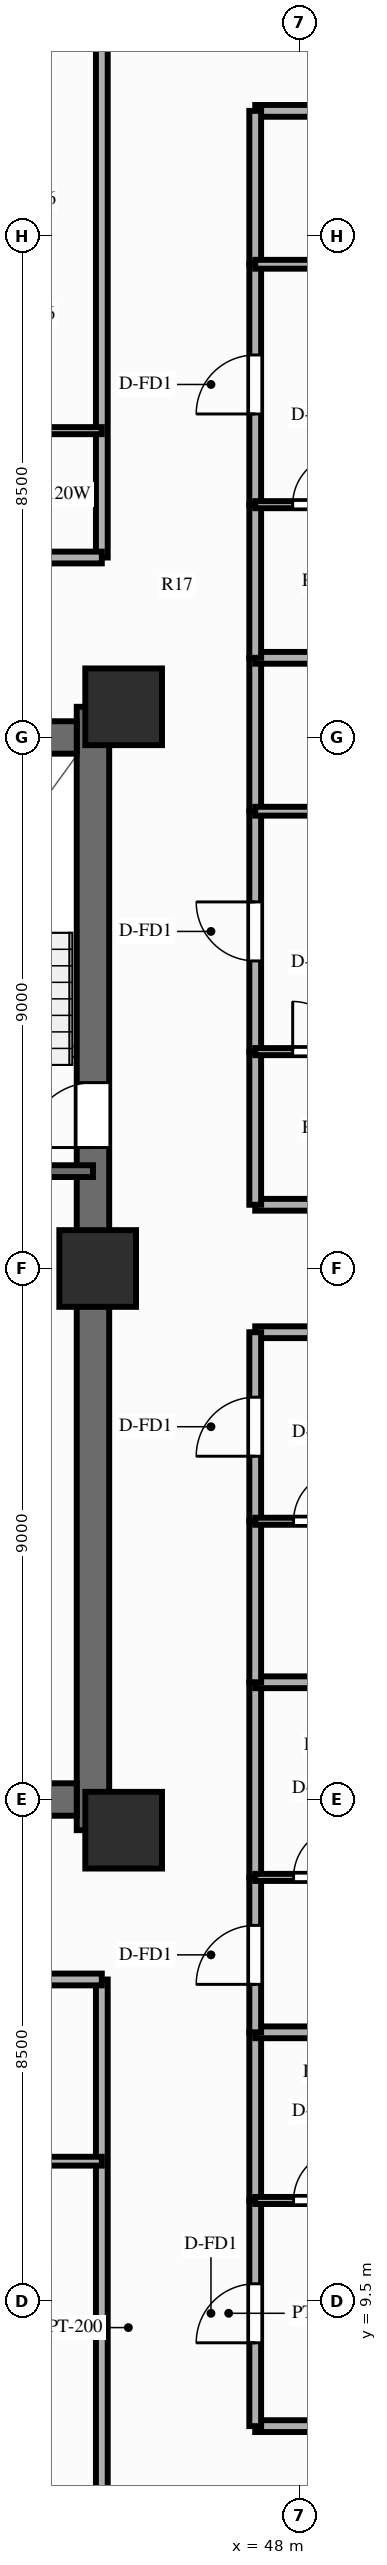
"""IFC4 building model, lengths in metres.
Left out: names, types, materials, properties, quantities, classifications, styles, units other than length and angle.
Written with IfcOpenShell. Run it as: python <this file> out.ifc"""

import sys

from ifc_helpers import new_model, si_unit, direction, frame, frame_2d, origin, origin_2d, place, context, subcontext, project, spatial, rectangle, extrude, source, transform, mapped, element, fill, save


model = new_model("IFC4")
c1 = context("Model", 3, precision=1e-05, world=origin(), true_north=direction((0.0, 1.0)))
c2 = subcontext(c1, "Body", "Model", "MODEL_VIEW")
j1 = project(units=[si_unit("LENGTHUNIT", "METRE"), si_unit("PLANEANGLEUNIT", "RADIAN")], contexts=[c1])
p1 = place(None, origin())
s1 = spatial("IfcSite", under=j1, at=p1, CompositionType="ELEMENT")
p2 = place(p1, origin())
s2 = spatial("IfcBuilding", under=s1, at=p2, CompositionType="ELEMENT")
p3 = place(p2, frame((0.0, 0.0, 113.85)))
s3 = spatial("IfcBuildingStorey", under=s2, at=p3, CompositionType="ELEMENT", Elevation=113.85)
p4 = place(p3, frame((44.5, 17.48, 0.0), z_axis=(0.0, 0.0, 1.0), x_axis=(0.0, 1.0, 0.0)))
e1 = element("IfcWall", 1, at=p4, inside=s3, PredefinedType="SHEAR", context=c2, shape_type="SweptSolid", body=[
    extrude(rectangle(XDim=19.04, YDim=0.55, at=frame_2d((9.52, 0.0))), origin(), (0.0, 0.0, 1.0), 3.0),
])
p5 = place(p4, frame((12.67, 0.0, 0.0), z_axis=(0.0, 0.0, 1.0), x_axis=(-1.0, 0.0, 0.0)))
e2 = element("IfcOpeningElement", 2, at=p5, cuts=e1, PredefinedType="OPENING", context=c2, shape_type="SweptSolid", body=[
    extrude(rectangle(XDim=1.1, YDim=2.15, at=frame_2d((0.55, 1.075))), frame((0.0, 0.287, 0.0), z_axis=(0.0, -1.0, 0.0), x_axis=(1.0, 0.0, 0.0)), (0.0, 0.0, 1.0), 0.574),
])
p6 = place(p3, frame((31.775, 18.0, 0.0), z_axis=(0.0, 0.0, 1.0), x_axis=(1.0, 0.0, 0.0)))
e3 = element("IfcWall", 3, at=p6, inside=s3, PredefinedType="SHEAR", context=c2, shape_type="SweptSolid", body=[
    extrude(rectangle(XDim=12.45, YDim=0.55, at=frame_2d((6.225, 0.0))), origin(), (0.0, 0.0, 1.0), 3.0),
])
p7 = place(p3, frame((31.775, 36.0, 0.0), z_axis=(0.0, 0.0, 1.0), x_axis=(1.0, 0.0, 0.0)))
e4 = element("IfcWall", 4, at=p7, inside=s3, PredefinedType="SHEAR", context=c2, shape_type="SweptSolid", body=[
    extrude(rectangle(XDim=12.45, YDim=0.55, at=frame_2d((6.225, 0.0))), origin(), (0.0, 0.0, 1.0), 3.0),
])
p8 = place(p7, frame((5.175, 0.0, 0.0), z_axis=(0.0, 0.0, 1.0), x_axis=(-1.0, 0.0, 0.0)))
e5 = element("IfcOpeningElement", 5, at=p8, cuts=e4, PredefinedType="OPENING", context=c2, shape_type="SweptSolid", body=[
    extrude(rectangle(XDim=1.4, YDim=2.15, at=frame_2d((0.7, 1.075))), frame((0.0, 0.287, 0.0), z_axis=(0.0, -1.0, 0.0), x_axis=(1.0, 0.0, 0.0)), (0.0, 0.0, 1.0), 0.574),
])
m1 = source(origin(), c2, "Body", "SweptSolid", [
    extrude(rectangle(XDim=1.3, YDim=1.3, at=origin_2d()), origin(), (0.0, 0.0, 1.0), 3.0),
])
for number, where, z_axis, x_axis in (
    (6, (45.02, 17.48, 0.0), (0.0, 0.0, 1.0), (1.0, 0.0, 0.0)),
    (7, (45.02, 36.52, 0.0), (0.0, 0.0, 1.0), (1.0, 0.0, 0.0)),
    (8, (44.58, 27.0, 0.0), (0.0, 0.0, 1.0), (1.0, 0.0, 0.0)),
):
    element("IfcColumn", number, at=place(p3, frame(where, z_axis=z_axis, x_axis=x_axis)), inside=s3, PredefinedType="COLUMN", context=c2, shape_type="MappedRepresentation", body=[
        mapped(m1, transform((0.0, 0.0, 0.0), scale=1.0)),
    ])
p9 = place(p3, frame((40.57, 28.65, 0.0), z_axis=(0.0, 0.0, 1.0), x_axis=(1.0, 0.0, 0.0)))
e9 = element("IfcWall", 9, at=p9, inside=s3, PredefinedType="SOLIDWALL", context=c2, shape_type="SweptSolid", body=[
    extrude(rectangle(XDim=3.93, YDim=0.2, at=frame_2d((1.965, 0.0))), origin(), (0.0, 0.0, 1.0), 2.79),
])
p10 = place(p3, frame((44.65, 14.95, 0.0), z_axis=(0.0, 0.0, 1.0), x_axis=(0.0, -1.0, 0.0)))
e10 = element("IfcWall", 10, at=p10, inside=s3, PredefinedType="PARTITIONING", context=c2, shape_type="SweptSolid", body=[
    extrude(rectangle(XDim=11.8, YDim=0.2, at=frame_2d((5.9, 0.0))), origin(), (0.0, 0.0, 1.0), 2.34),
])
p11 = place(p3, frame((40.923, 14.95, 0.0), z_axis=(0.0, 0.0, 1.0), x_axis=(1.0, 0.0, 0.0)))
e11 = element("IfcWall", 11, at=p11, inside=s3, PredefinedType="PARTITIONING", context=c2, shape_type="SweptSolid", body=[
    extrude(rectangle(XDim=3.727, YDim=0.2, at=frame_2d((1.864, 0.0))), origin(), (0.0, 0.0, 1.0), 2.79),
])
p12 = place(p3, frame((40.923, 11.87, 0.0), z_axis=(0.0, 0.0, 1.0), x_axis=(1.0, 0.0, 0.0)))
e12 = element("IfcWall", 12, at=p12, inside=s3, PredefinedType="PARTITIONING", context=c2, shape_type="SweptSolid", body=[
    extrude(rectangle(XDim=3.727, YDim=0.15, at=frame_2d((1.864, 0.0))), origin(), (0.0, 0.0, 1.0), 2.79),
])
p13 = place(p3, frame((44.65, 39.05, 0.0), z_axis=(0.0, 0.0, 1.0), x_axis=(0.0, 1.0, 0.0)))
e13 = element("IfcWall", 13, at=p13, inside=s3, PredefinedType="PARTITIONING", context=c2, shape_type="SweptSolid", body=[
    extrude(rectangle(XDim=11.8, YDim=0.2, at=frame_2d((5.9, 0.0))), origin(), (0.0, 0.0, 1.0), 2.34),
])
p14 = place(p3, frame((42.55, 39.05, 0.0), z_axis=(0.0, 0.0, 1.0), x_axis=(1.0, 0.0, 0.0)))
e14 = element("IfcWall", 14, at=p14, inside=s3, PredefinedType="PARTITIONING", context=c2, shape_type="SweptSolid", body=[
    extrude(rectangle(XDim=2.1, YDim=0.2, at=frame_2d((1.05, 0.0))), origin(), (0.0, 0.0, 1.0), 2.79),
])
p15 = place(p3, frame((42.55, 41.2, 0.0), z_axis=(0.0, 0.0, 1.0), x_axis=(1.0, 0.0, 0.0)))
e15 = element("IfcWall", 15, at=p15, inside=s3, PredefinedType="PARTITIONING", context=c2, shape_type="SweptSolid", body=[
    extrude(rectangle(XDim=2.1, YDim=0.12, at=frame_2d((1.05, 0.0))), origin(), (0.0, 0.0, 1.0), 2.79),
])
for number, where, z_axis, x_axis in (
    (16, (47.25, 7.38, 0.0), (0.0, 0.0, 1.0), (1.0, 0.0, 0.0)),
    (17, (47.25, 25.92, 0.0), (0.0, 0.0, 1.0), (1.0, 0.0, 0.0)),
):
    element("IfcWall", number, at=place(p3, frame(where, z_axis=z_axis, x_axis=x_axis)), inside=s3, PredefinedType="PARTITIONING", context=c2, shape_type="SweptSolid", body=[
        extrude(rectangle(XDim=16.6, YDim=0.2, at=frame_2d((8.3, 0.0))), origin(), (0.0, 0.0, 1.0), 2.79),
    ])
p16 = place(p3, frame((47.25, 7.38, 0.0), z_axis=(0.0, 0.0, 1.0), x_axis=(0.0, 1.0, 0.0)))
e18 = element("IfcWall", 18, at=p16, inside=s3, PredefinedType="PARTITIONING", context=c2, shape_type="SweptSolid", body=[
    extrude(rectangle(XDim=3.824, YDim=0.2, at=frame_2d((1.912, 0.0))), origin(), (0.0, 0.0, 1.0), 2.79),
])
p17 = place(p16, frame((1.412, 0.0, 0.0)))
e19 = element("IfcOpeningElement", 19, at=p17, cuts=e18, PredefinedType="OPENING", context=c2, shape_type="SweptSolid", body=[
    extrude(rectangle(XDim=1.0, YDim=2.15, at=frame_2d((0.5, 1.075))), frame((0.0, 0.112, 0.0), z_axis=(0.0, -1.0, 0.0), x_axis=(1.0, 0.0, 0.0)), (0.0, 0.0, 1.0), 0.224),
])
p18 = place(p3, frame((47.25, 11.204, 0.0), z_axis=(0.0, 0.0, 1.0), x_axis=(0.0, 1.0, 0.0)))
e20 = element("IfcWall", 20, at=p18, inside=s3, PredefinedType="PARTITIONING", context=c2, shape_type="SweptSolid", body=[
    extrude(rectangle(XDim=2.85, YDim=0.2, at=frame_2d((1.425, 0.0))), origin(), (0.0, 0.0, 1.0), 2.79),
])
p19 = place(p3, frame((47.25, 11.204, 0.0), z_axis=(0.0, 0.0, 1.0), x_axis=(1.0, 0.0, 0.0)))
e21 = element("IfcWall", 21, at=p19, inside=s3, PredefinedType="PARTITIONING", context=c2, shape_type="SweptSolid", body=[
    extrude(rectangle(XDim=2.15, YDim=0.12, at=frame_2d((1.075, 0.0))), origin(), (0.0, 0.0, 1.0), 2.79),
])
p20 = place(p19, frame((0.65, 0.0, 0.0)))
e22 = element("IfcOpeningElement", 22, at=p20, cuts=e21, PredefinedType="OPENING", context=c2, shape_type="SweptSolid", body=[
    extrude(rectangle(XDim=0.85, YDim=2.05, at=frame_2d((0.425, 1.025))), frame((0.0, 0.072, 0.0), z_axis=(0.0, -1.0, 0.0), x_axis=(1.0, 0.0, 0.0)), (0.0, 0.0, 1.0), 0.144),
])
p21 = place(p3, frame((47.25, 14.054, 0.0), z_axis=(0.0, 0.0, 1.0), x_axis=(1.0, 0.0, 0.0)))
e23 = element("IfcWall", 23, at=p21, inside=s3, PredefinedType="PARTITIONING", context=c2, shape_type="SweptSolid", body=[
    extrude(rectangle(XDim=16.6, YDim=0.2, at=frame_2d((8.3, 0.0))), origin(), (0.0, 0.0, 1.0), 2.79),
])
p22 = place(p3, frame((47.25, 14.054, 0.0), z_axis=(0.0, 0.0, 1.0), x_axis=(0.0, 1.0, 0.0)))
e24 = element("IfcWall", 24, at=p22, inside=s3, PredefinedType="PARTITIONING", context=c2, shape_type="SweptSolid", body=[
    extrude(rectangle(XDim=2.625, YDim=0.2, at=frame_2d((1.313, 0.0))), origin(), (0.0, 0.0, 1.0), 2.79),
])
p23 = place(p22, frame((0.813, 0.0, 0.0)))
e25 = element("IfcOpeningElement", 25, at=p23, cuts=e24, PredefinedType="OPENING", context=c2, shape_type="SweptSolid", body=[
    extrude(rectangle(XDim=1.0, YDim=2.15, at=frame_2d((0.5, 1.075))), frame((0.0, 0.112, 0.0), z_axis=(0.0, -1.0, 0.0), x_axis=(1.0, 0.0, 0.0)), (0.0, 0.0, 1.0), 0.224),
])
p24 = place(p3, frame((47.25, 16.68, 0.0), z_axis=(0.0, 0.0, 1.0), x_axis=(0.0, 1.0, 0.0)))
e26 = element("IfcWall", 26, at=p24, inside=s3, PredefinedType="PARTITIONING", context=c2, shape_type="SweptSolid", body=[
    extrude(rectangle(XDim=3.307, YDim=0.2, at=frame_2d((1.654, 0.0))), origin(), (0.0, 0.0, 1.0), 2.79),
])
p25 = place(p3, frame((47.25, 16.68, 0.0), z_axis=(0.0, 0.0, 1.0), x_axis=(1.0, 0.0, 0.0)))
e27 = element("IfcWall", 27, at=p25, inside=s3, PredefinedType="PARTITIONING", context=c2, shape_type="SweptSolid", body=[
    extrude(rectangle(XDim=2.15, YDim=0.12, at=frame_2d((1.075, 0.0))), origin(), (0.0, 0.0, 1.0), 2.79),
])
p26 = place(p25, frame((0.65, 0.0, 0.0)))
e28 = element("IfcOpeningElement", 28, at=p26, cuts=e27, PredefinedType="OPENING", context=c2, shape_type="SweptSolid", body=[
    extrude(rectangle(XDim=0.85, YDim=2.05, at=frame_2d((0.425, 1.025))), frame((0.0, 0.072, 0.0), z_axis=(0.0, -1.0, 0.0), x_axis=(1.0, 0.0, 0.0)), (0.0, 0.0, 1.0), 0.144),
])
p27 = place(p3, frame((47.25, 19.987, 0.0), z_axis=(0.0, 0.0, 1.0), x_axis=(1.0, 0.0, 0.0)))
e29 = element("IfcWall", 29, at=p27, inside=s3, PredefinedType="PARTITIONING", context=c2, shape_type="SweptSolid", body=[
    extrude(rectangle(XDim=16.6, YDim=0.2, at=frame_2d((8.3, 0.0))), origin(), (0.0, 0.0, 1.0), 2.79),
])
p28 = place(p3, frame((47.25, 19.987, 0.0), z_axis=(0.0, 0.0, 1.0), x_axis=(0.0, 1.0, 0.0)))
e30 = element("IfcWall", 30, at=p28, inside=s3, PredefinedType="PARTITIONING", context=c2, shape_type="SweptSolid", body=[
    extrude(rectangle(XDim=2.729, YDim=0.2, at=frame_2d((1.365, 0.0))), origin(), (0.0, 0.0, 1.0), 2.79),
])
p29 = place(p3, frame((47.25, 22.716, 0.0), z_axis=(0.0, 0.0, 1.0), x_axis=(0.0, 1.0, 0.0)))
e31 = element("IfcWall", 31, at=p29, inside=s3, PredefinedType="PARTITIONING", context=c2, shape_type="SweptSolid", body=[
    extrude(rectangle(XDim=3.204, YDim=0.2, at=frame_2d((1.602, 0.0))), origin(), (0.0, 0.0, 1.0), 2.79),
])
p30 = place(p29, frame((1.102, 0.0, 0.0)))
e32 = element("IfcOpeningElement", 32, at=p30, cuts=e31, PredefinedType="OPENING", context=c2, shape_type="SweptSolid", body=[
    extrude(rectangle(XDim=1.0, YDim=2.15, at=frame_2d((0.5, 1.075))), frame((0.0, 0.112, 0.0), z_axis=(0.0, -1.0, 0.0), x_axis=(1.0, 0.0, 0.0)), (0.0, 0.0, 1.0), 0.224),
])
p31 = place(p3, frame((47.25, 22.716, 0.0), z_axis=(0.0, 0.0, 1.0), x_axis=(1.0, 0.0, 0.0)))
e33 = element("IfcWall", 33, at=p31, inside=s3, PredefinedType="PARTITIONING", context=c2, shape_type="SweptSolid", body=[
    extrude(rectangle(XDim=2.15, YDim=0.12, at=frame_2d((1.075, 0.0))), origin(), (0.0, 0.0, 1.0), 2.79),
])
p32 = place(p31, frame((0.65, 0.0, 0.0)))
e34 = element("IfcOpeningElement", 34, at=p32, cuts=e33, PredefinedType="OPENING", context=c2, shape_type="SweptSolid", body=[
    extrude(rectangle(XDim=0.85, YDim=2.05, at=frame_2d((0.425, 1.025))), frame((0.0, 0.072, 0.0), z_axis=(0.0, -1.0, 0.0), x_axis=(1.0, 0.0, 0.0)), (0.0, 0.0, 1.0), 0.144),
])
for number, where, z_axis, x_axis in (
    (35, (47.25, 28.08, 0.0), (0.0, 0.0, 1.0), (1.0, 0.0, 0.0)),
    (36, (47.25, 46.62, 0.0), (0.0, 0.0, 1.0), (1.0, 0.0, 0.0)),
):
    element("IfcWall", number, at=place(p3, frame(where, z_axis=z_axis, x_axis=x_axis)), inside=s3, PredefinedType="PARTITIONING", context=c2, shape_type="SweptSolid", body=[
        extrude(rectangle(XDim=16.6, YDim=0.2, at=frame_2d((8.3, 0.0))), origin(), (0.0, 0.0, 1.0), 2.79),
    ])
p33 = place(p3, frame((47.25, 28.08, 0.0), z_axis=(0.0, 0.0, 1.0), x_axis=(0.0, 1.0, 0.0)))
e37 = element("IfcWall", 37, at=p33, inside=s3, PredefinedType="PARTITIONING", context=c2, shape_type="SweptSolid", body=[
    extrude(rectangle(XDim=2.595, YDim=0.2, at=frame_2d((1.298, 0.0))), origin(), (0.0, 0.0, 1.0), 2.79),
])
p34 = place(p3, frame((47.25, 30.676, 0.0), z_axis=(0.0, 0.0, 1.0), x_axis=(0.0, 1.0, 0.0)))
e38 = element("IfcWall", 38, at=p34, inside=s3, PredefinedType="PARTITIONING", context=c2, shape_type="SweptSolid", body=[
    extrude(rectangle(XDim=4.074, YDim=0.2, at=frame_2d((2.037, 0.0))), origin(), (0.0, 0.0, 1.0), 2.79),
])
p35 = place(p34, frame((1.537, 0.0, 0.0)))
e39 = element("IfcOpeningElement", 39, at=p35, cuts=e38, PredefinedType="OPENING", context=c2, shape_type="SweptSolid", body=[
    extrude(rectangle(XDim=1.0, YDim=2.15, at=frame_2d((0.5, 1.075))), frame((0.0, 0.112, 0.0), z_axis=(0.0, -1.0, 0.0), x_axis=(1.0, 0.0, 0.0)), (0.0, 0.0, 1.0), 0.224),
])
p36 = place(p3, frame((47.25, 34.75, 0.0), z_axis=(0.0, 0.0, 1.0), x_axis=(0.0, 1.0, 0.0)))
e40 = element("IfcWall", 40, at=p36, inside=s3, PredefinedType="PARTITIONING", context=c2, shape_type="SweptSolid", body=[
    extrude(rectangle(XDim=2.6, YDim=0.2, at=frame_2d((1.3, 0.0))), origin(), (0.0, 0.0, 1.0), 2.79),
])
p37 = place(p3, frame((47.25, 30.676, 0.0), z_axis=(0.0, 0.0, 1.0), x_axis=(1.0, 0.0, 0.0)))
e41 = element("IfcWall", 41, at=p37, inside=s3, PredefinedType="PARTITIONING", context=c2, shape_type="SweptSolid", body=[
    extrude(rectangle(XDim=2.12, YDim=0.12, at=frame_2d((1.06, 0.0))), origin(), (0.0, 0.0, 1.0), 2.79),
])
p38 = place(p37, frame((0.635, 0.0, 0.0)))
e42 = element("IfcOpeningElement", 42, at=p38, cuts=e41, PredefinedType="OPENING", context=c2, shape_type="SweptSolid", body=[
    extrude(rectangle(XDim=0.85, YDim=2.05, at=frame_2d((0.425, 1.025))), frame((0.0, 0.072, 0.0), z_axis=(0.0, -1.0, 0.0), x_axis=(1.0, 0.0, 0.0)), (0.0, 0.0, 1.0), 0.144),
])
p39 = place(p3, frame((47.25, 34.75, 0.0), z_axis=(0.0, 0.0, 1.0), x_axis=(1.0, 0.0, 0.0)))
e43 = element("IfcWall", 43, at=p39, inside=s3, PredefinedType="PARTITIONING", context=c2, shape_type="SweptSolid", body=[
    extrude(rectangle(XDim=3.08, YDim=0.15, at=frame_2d((1.54, 0.0))), origin(), (0.0, 0.0, 1.0), 2.79),
])
p40 = place(p39, frame((1.09, 0.0, 0.0)))
e44 = element("IfcOpeningElement", 44, at=p40, cuts=e43, PredefinedType="OPENING", context=c2, shape_type="SweptSolid", body=[
    extrude(rectangle(XDim=0.9, YDim=2.1, at=frame_2d((0.45, 1.05))), frame((0.0, 0.087, 0.0), z_axis=(0.0, -1.0, 0.0), x_axis=(1.0, 0.0, 0.0)), (0.0, 0.0, 1.0), 0.174),
])
p41 = place(p3, frame((47.25, 37.35, 0.0), z_axis=(0.0, 0.0, 1.0), x_axis=(1.0, 0.0, 0.0)))
e45 = element("IfcWall", 45, at=p41, inside=s3, PredefinedType="PARTITIONING", context=c2, shape_type="SweptSolid", body=[
    extrude(rectangle(XDim=16.6, YDim=0.2, at=frame_2d((8.3, 0.0))), origin(), (0.0, 0.0, 1.0), 2.79),
])
p42 = place(p3, frame((47.25, 37.35, 0.0), z_axis=(0.0, 0.0, 1.0), x_axis=(0.0, 1.0, 0.0)))
e46 = element("IfcWall", 46, at=p42, inside=s3, PredefinedType="PARTITIONING", context=c2, shape_type="SweptSolid", body=[
    extrude(rectangle(XDim=2.595, YDim=0.2, at=frame_2d((1.298, 0.0))), origin(), (0.0, 0.0, 1.0), 2.79),
])
p43 = place(p3, frame((47.25, 39.946, 0.0), z_axis=(0.0, 0.0, 1.0), x_axis=(0.0, 1.0, 0.0)))
e47 = element("IfcWall", 47, at=p43, inside=s3, PredefinedType="PARTITIONING", context=c2, shape_type="SweptSolid", body=[
    extrude(rectangle(XDim=4.074, YDim=0.2, at=frame_2d((2.037, 0.0))), origin(), (0.0, 0.0, 1.0), 2.79),
])
p44 = place(p43, frame((1.537, 0.0, 0.0)))
e48 = element("IfcOpeningElement", 48, at=p44, cuts=e47, PredefinedType="OPENING", context=c2, shape_type="SweptSolid", body=[
    extrude(rectangle(XDim=1.0, YDim=2.15, at=frame_2d((0.5, 1.075))), frame((0.0, 0.112, 0.0), z_axis=(0.0, -1.0, 0.0), x_axis=(1.0, 0.0, 0.0)), (0.0, 0.0, 1.0), 0.224),
])
p45 = place(p3, frame((47.25, 44.02, 0.0), z_axis=(0.0, 0.0, 1.0), x_axis=(0.0, 1.0, 0.0)))
e49 = element("IfcWall", 49, at=p45, inside=s3, PredefinedType="PARTITIONING", context=c2, shape_type="SweptSolid", body=[
    extrude(rectangle(XDim=2.6, YDim=0.2, at=frame_2d((1.3, 0.0))), origin(), (0.0, 0.0, 1.0), 2.79),
])
p46 = place(p3, frame((47.25, 39.946, 0.0), z_axis=(0.0, 0.0, 1.0), x_axis=(1.0, 0.0, 0.0)))
e50 = element("IfcWall", 50, at=p46, inside=s3, PredefinedType="PARTITIONING", context=c2, shape_type="SweptSolid", body=[
    extrude(rectangle(XDim=2.12, YDim=0.12, at=frame_2d((1.06, 0.0))), origin(), (0.0, 0.0, 1.0), 2.79),
])
p47 = place(p46, frame((0.635, 0.0, 0.0)))
e51 = element("IfcOpeningElement", 51, at=p47, cuts=e50, PredefinedType="OPENING", context=c2, shape_type="SweptSolid", body=[
    extrude(rectangle(XDim=0.85, YDim=2.05, at=frame_2d((0.425, 1.025))), frame((0.0, 0.072, 0.0), z_axis=(0.0, -1.0, 0.0), x_axis=(1.0, 0.0, 0.0)), (0.0, 0.0, 1.0), 0.144),
])
p48 = place(p3, frame((47.25, 44.02, 0.0), z_axis=(0.0, 0.0, 1.0), x_axis=(1.0, 0.0, 0.0)))
e52 = element("IfcWall", 52, at=p48, inside=s3, PredefinedType="PARTITIONING", context=c2, shape_type="SweptSolid", body=[
    extrude(rectangle(XDim=3.08, YDim=0.15, at=frame_2d((1.54, 0.0))), origin(), (0.0, 0.0, 1.0), 2.79),
])
p49 = place(p48, frame((1.09, 0.0, 0.0)))
e53 = element("IfcOpeningElement", 53, at=p49, cuts=e52, PredefinedType="OPENING", context=c2, shape_type="SweptSolid", body=[
    extrude(rectangle(XDim=0.9, YDim=2.1, at=frame_2d((0.45, 1.05))), frame((0.0, 0.087, 0.0), z_axis=(0.0, -1.0, 0.0), x_axis=(1.0, 0.0, 0.0)), (0.0, 0.0, 1.0), 0.174),
])
m2 = source(origin(), c2, "Body", "SweptSolid", [
    extrude(rectangle(XDim=1.1, YDim=2.15, at=frame_2d((0.55, 1.075))), frame((0.0, 0.025, 0.0), z_axis=(0.0, -1.0, 0.0), x_axis=(1.0, 0.0, 0.0)), (0.0, 0.0, 1.0), 0.05),
])
p50 = place(p5, origin())
e54 = element("IfcDoor", 54, at=p50, inside=s3, OperationType="SINGLE_SWING_RIGHT", PredefinedType="DOOR", context=c2, shape_type="MappedRepresentation", body=[
    mapped(m2, transform((0.0, 0.0, 0.0), scale=1.0)),
])
fill(e2, e54)
m3 = source(origin(), c2, "Body", "SweptSolid", [
    extrude(rectangle(XDim=1.0, YDim=2.15, at=frame_2d((0.5, 1.075))), frame((0.0, 0.025, 0.0), z_axis=(0.0, -1.0, 0.0), x_axis=(1.0, 0.0, 0.0)), (0.0, 0.0, 1.0), 0.05),
])
p51 = place(p17, origin())
e55 = element("IfcDoor", 55, at=p51, inside=s3, OperationType="SINGLE_SWING_LEFT", PredefinedType="DOOR", context=c2, shape_type="MappedRepresentation", body=[
    mapped(m3, transform((0.0, 0.0, 0.0), scale=1.0)),
])
fill(e19, e55)
m4 = source(origin(), c2, "Body", "SweptSolid", [
    extrude(rectangle(XDim=0.85, YDim=2.05, at=frame_2d((0.425, 1.025))), frame((0.0, 0.025, 0.0), z_axis=(0.0, -1.0, 0.0), x_axis=(1.0, 0.0, 0.0)), (0.0, 0.0, 1.0), 0.05),
])
p52 = place(p20, origin())
e56 = element("IfcDoor", 56, at=p52, inside=s3, OperationType="SINGLE_SWING_RIGHT", PredefinedType="DOOR", context=c2, shape_type="MappedRepresentation", body=[
    mapped(m4, transform((0.0, 0.0, 0.0), scale=1.0)),
])
fill(e22, e56)
p53 = place(p23, origin())
e57 = element("IfcDoor", 57, at=p53, inside=s3, OperationType="SINGLE_SWING_LEFT", PredefinedType="DOOR", context=c2, shape_type="MappedRepresentation", body=[
    mapped(m3, transform((0.0, 0.0, 0.0), scale=1.0)),
])
fill(e25, e57)
p54 = place(p26, origin())
e58 = element("IfcDoor", 58, at=p54, inside=s3, OperationType="SINGLE_SWING_RIGHT", PredefinedType="DOOR", context=c2, shape_type="MappedRepresentation", body=[
    mapped(m4, transform((0.0, 0.0, 0.0), scale=1.0)),
])
fill(e28, e58)
p55 = place(p30, origin())
e59 = element("IfcDoor", 59, at=p55, inside=s3, OperationType="SINGLE_SWING_LEFT", PredefinedType="DOOR", context=c2, shape_type="MappedRepresentation", body=[
    mapped(m3, transform((0.0, 0.0, 0.0), scale=1.0)),
])
fill(e32, e59)
p56 = place(p32, origin())
e60 = element("IfcDoor", 60, at=p56, inside=s3, OperationType="SINGLE_SWING_RIGHT", PredefinedType="DOOR", context=c2, shape_type="MappedRepresentation", body=[
    mapped(m4, transform((0.0, 0.0, 0.0), scale=1.0)),
])
fill(e34, e60)
p57 = place(p35, origin())
e61 = element("IfcDoor", 61, at=p57, inside=s3, OperationType="SINGLE_SWING_RIGHT", PredefinedType="DOOR", context=c2, shape_type="MappedRepresentation", body=[
    mapped(m3, transform((0.0, 0.0, 0.0), scale=1.0)),
])
fill(e39, e61)
p58 = place(p38, origin())
e62 = element("IfcDoor", 62, at=p58, inside=s3, OperationType="SINGLE_SWING_LEFT", PredefinedType="DOOR", context=c2, shape_type="MappedRepresentation", body=[
    mapped(m4, transform((0.0, 0.0, 0.0), scale=1.0)),
])
fill(e42, e62)
p59 = place(p44, origin())
e63 = element("IfcDoor", 63, at=p59, inside=s3, OperationType="SINGLE_SWING_LEFT", PredefinedType="DOOR", context=c2, shape_type="MappedRepresentation", body=[
    mapped(m3, transform((0.0, 0.0, 0.0), scale=1.0)),
])
fill(e48, e63)
p60 = place(p47, origin())
e64 = element("IfcDoor", 64, at=p60, inside=s3, OperationType="SINGLE_SWING_RIGHT", PredefinedType="DOOR", context=c2, shape_type="MappedRepresentation", body=[
    mapped(m4, transform((0.0, 0.0, 0.0), scale=1.0)),
])
fill(e51, e64)
save(model, sys.argv[1])
